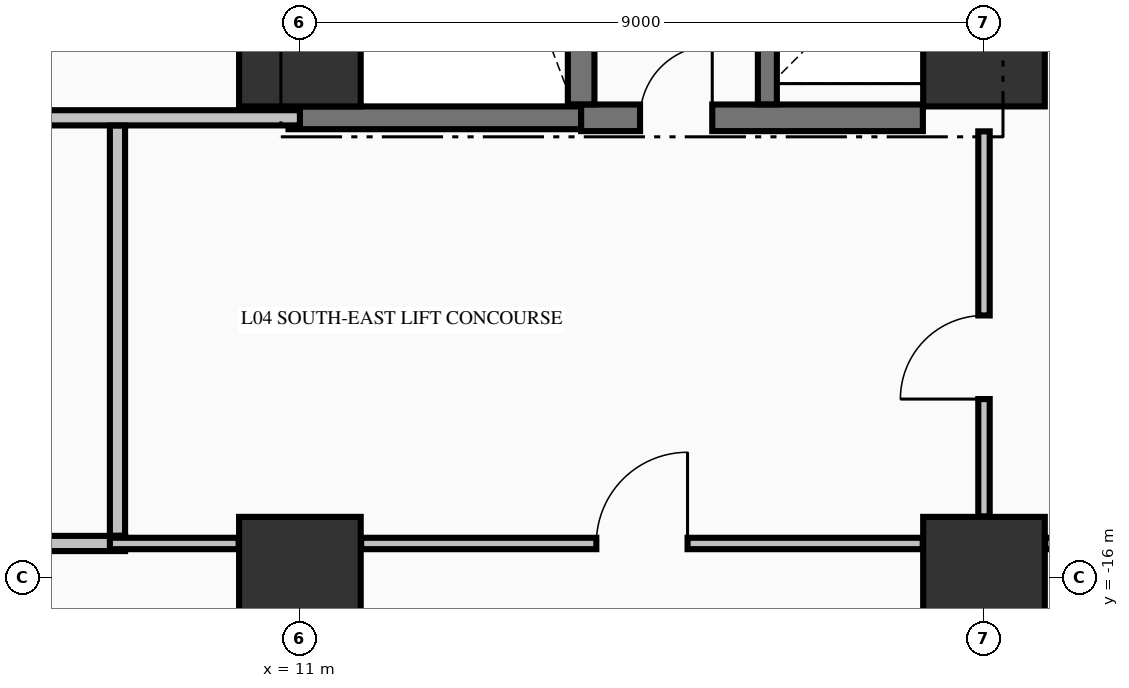
"""IFC4 building model, lengths in metres.
Left out: names, types, materials, properties, quantities, classifications, styles, units other than length and angle.
Written with IfcOpenShell. Run it as: python <this file> out.ifc"""

import sys

from ifc_helpers import new_model, si_unit, direction, frame, frame_2d, origin, origin_2d, place, context, subcontext, project, spatial, rectangle, extrude, element, fill, save


model = new_model("IFC4")
c1 = context("Model", 3, precision=1e-05, world=origin(), true_north=direction((0.0, 1.0)))
c2 = subcontext(c1, "Body", "Model", "MODEL_VIEW")
j1 = project(units=[si_unit("LENGTHUNIT", "METRE"), si_unit("PLANEANGLEUNIT", "RADIAN")], contexts=[c1])
p1 = place(None, origin())
s1 = spatial("IfcSite", under=j1, at=p1, CompositionType="ELEMENT")
p2 = place(p1, origin())
s2 = spatial("IfcBuilding", under=s1, at=p2, CompositionType="ELEMENT")
p3 = place(p2, frame((0.0, 0.0, 21.76)))
s3 = spatial("IfcBuildingStorey", under=s2, at=p3, CompositionType="ELEMENT", Elevation=21.76)
for number, where, z_axis, x_axis in (
    (1, (11.0, -16.0, -0.45), (0.0, 0.0, 1.0), (1.0, 0.0, 0.0)),
    (2, (11.0, -9.0, -0.45), (0.0, 0.0, 1.0), (1.0, 0.0, 0.0)),
    (3, (20.0, -16.0, -0.45), (0.0, 0.0, 1.0), (1.0, 0.0, 0.0)),
    (4, (20.0, -9.0, -0.45), (0.0, 0.0, 1.0), (1.0, 0.0, 0.0)),
):
    element("IfcColumn", number, at=place(p3, frame(where, z_axis=z_axis, x_axis=x_axis)), inside=s3, PredefinedType="COLUMN", context=c2, shape_type="SweptSolid", body=[
        extrude(rectangle(XDim=1.6, YDim=1.6, at=origin_2d()), origin(), (0.0, 0.0, 1.0), 5.44),
    ])
p4 = place(p3, frame((10.85, -9.95, 0.0), z_axis=(0.0, 0.0, 1.0), x_axis=(1.0, 0.0, 0.0)))
e5 = element("IfcWall", 5, at=p4, inside=s3, PredefinedType="SHEAR", context=c2, shape_type="SweptSolid", body=[
    extrude(rectangle(XDim=3.85, YDim=0.3, at=frame_2d((1.925, 0.0))), origin(), (0.0, 0.0, 1.0), 4.99),
])
p5 = place(p3, frame((14.7, -9.95, 0.0), z_axis=(0.0, 0.0, 1.0), x_axis=(1.0, 0.0, 0.0)))
e6 = element("IfcWall", 6, at=p5, inside=s3, PredefinedType="SHEAR", context=c2, shape_type="SweptSolid", body=[
    extrude(rectangle(XDim=4.496, YDim=0.35, at=frame_2d((2.248, 0.0))), origin(), (0.0, 0.0, 1.0), 4.99),
])
p6 = place(p5, frame((0.775, 0.0, 0.0)))
e7 = element("IfcOpeningElement", 7, at=p6, cuts=e6, PredefinedType="OPENING", context=c2, shape_type="SweptSolid", body=[
    extrude(rectangle(XDim=0.95, YDim=2.15, at=frame_2d((0.475, 1.075))), frame((0.0, 0.185, 0.0), z_axis=(0.0, -1.0, 0.0), x_axis=(1.0, 0.0, 0.0)), (0.0, 0.0, 1.0), 0.37),
])
p7 = place(p3, frame((0.706, -15.55, 0.0), z_axis=(0.0, 0.0, 1.0), x_axis=(1.0, 0.0, 0.0)))
e8 = element("IfcWall", 8, at=p7, inside=s3, PredefinedType="PARTITIONING", context=c2, shape_type="SweptSolid", body=[
    extrude(rectangle(XDim=7.994, YDim=0.2, at=frame_2d((3.997, 0.0))), origin(), (0.0, 0.0, 1.0), 3.332),
])
p8 = place(p7, frame((2.994, 0.0, 0.0)))
e9 = element("IfcOpeningElement", 9, at=p8, cuts=e8, PredefinedType="OPENING", context=c2, shape_type="SweptSolid", body=[
    extrude(rectangle(XDim=1.2, YDim=2.15, at=frame_2d((0.6, 1.075))), frame((0.0, 0.11, 0.0), z_axis=(0.0, -1.0, 0.0), x_axis=(1.0, 0.0, 0.0)), (0.0, 0.0, 1.0), 0.22),
])
p9 = place(p3, frame((8.5, -15.55, 0.0), z_axis=(0.0, 0.0, 1.0), x_axis=(1.0, 0.0, 0.0)))
e10 = element("IfcWall", 10, at=p9, inside=s3, PredefinedType="PARTITIONING", context=c2, shape_type="SweptSolid", body=[
    extrude(rectangle(XDim=1.694, YDim=0.15, at=frame_2d((0.847, 0.0))), origin(), (0.0, 0.0, 1.0), 3.332),
])
p10 = place(p3, frame((11.806, -15.55, 0.0), z_axis=(0.0, 0.0, 1.0), x_axis=(1.0, 0.0, 0.0)))
e11 = element("IfcWall", 11, at=p10, inside=s3, PredefinedType="PARTITIONING", context=c2, shape_type="SweptSolid", body=[
    extrude(rectangle(XDim=7.388, YDim=0.15, at=frame_2d((3.694, 0.0))), origin(), (0.0, 0.0, 1.0), 3.332),
])
p11 = place(p10, frame((3.094, 0.0, 0.0)))
e12 = element("IfcOpeningElement", 12, at=p11, cuts=e11, PredefinedType="OPENING", context=c2, shape_type="SweptSolid", body=[
    extrude(rectangle(XDim=1.2, YDim=2.15, at=frame_2d((0.6, 1.075))), frame((0.0, 0.085, 0.0), z_axis=(0.0, -1.0, 0.0), x_axis=(1.0, 0.0, 0.0)), (0.0, 0.0, 1.0), 0.17),
])
p12 = place(p3, frame((20.806, -15.55, 0.0), z_axis=(0.0, 0.0, 1.0), x_axis=(1.0, 0.0, 0.0)))
e13 = element("IfcWall", 13, at=p12, inside=s3, PredefinedType="PARTITIONING", context=c2, shape_type="SweptSolid", body=[
    extrude(rectangle(XDim=4.488, YDim=0.15, at=frame_2d((2.244, 0.0))), origin(), (0.0, 0.0, 1.0), 3.332),
])
p13 = place(p12, frame((0.15, 0.0, 0.0)))
e14 = element("IfcOpeningElement", 14, at=p13, cuts=e13, PredefinedType="OPENING", context=c2, shape_type="SweptSolid", body=[
    extrude(rectangle(XDim=1.1, YDim=2.15, at=frame_2d((0.55, 1.075))), frame((0.0, 0.085, 0.0), z_axis=(0.0, -1.0, 0.0), x_axis=(1.0, 0.0, 0.0)), (0.0, 0.0, 1.0), 0.17),
])
p14 = place(p12, frame((2.844, 0.0, 0.0)))
e15 = element("IfcOpeningElement", 15, at=p14, cuts=e13, PredefinedType="OPENING", context=c2, shape_type="SweptSolid", body=[
    extrude(rectangle(XDim=1.1, YDim=2.15, at=frame_2d((0.55, 1.075))), frame((0.0, 0.085, 0.0), z_axis=(0.0, -1.0, 0.0), x_axis=(1.0, 0.0, 0.0)), (0.0, 0.0, 1.0), 0.17),
])
p15 = place(p3, frame((-4.4, -9.95, 0.0), z_axis=(0.0, 0.0, 1.0), x_axis=(1.0, 0.0, 0.0)))
e16 = element("IfcWall", 16, at=p15, inside=s3, PredefinedType="PARTITIONING", context=c2, shape_type="SweptSolid", body=[
    extrude(rectangle(XDim=15.4, YDim=0.2, at=frame_2d((7.7, 0.0))), origin(), (0.0, 0.0, 1.0), 3.332),
])
p16 = place(p3, frame((14.7, -9.773, 0.0), z_axis=(0.0, 0.0, 1.0), x_axis=(0.0, 1.0, 0.0)))
e17 = element("IfcWall", 17, at=p16, inside=s3, PredefinedType="SHEAR", context=c2, shape_type="SweptSolid", body=[
    extrude(rectangle(XDim=9.371, YDim=0.35, at=frame_2d((4.686, 0.0))), origin(), (0.0, 0.0, 1.0), 4.99),
])
p17 = place(p3, frame((17.15, -9.773, 0.0), z_axis=(0.0, 0.0, 1.0), x_axis=(0.0, 1.0, 0.0)))
e18 = element("IfcWall", 18, at=p17, inside=s3, PredefinedType="SOLIDWALL", context=c2, shape_type="SweptSolid", body=[
    extrude(rectangle(XDim=2.596, YDim=0.25, at=frame_2d((1.298, 0.0))), origin(), (0.0, 0.0, 1.0), 4.99),
])
p18 = place(p3, frame((8.6, -15.447, 0.0), z_axis=(0.0, 0.0, 1.0), x_axis=(0.0, 1.0, 0.0)))
e19 = element("IfcWall", 19, at=p18, inside=s3, PredefinedType="PARTITIONING", context=c2, shape_type="SweptSolid", body=[
    extrude(rectangle(XDim=5.394, YDim=0.2, at=frame_2d((2.697, 0.0))), origin(), (0.0, 0.0, 1.0), 4.99),
])
p19 = place(p3, frame((20.0, -15.194, 0.0), z_axis=(0.0, 0.0, 1.0), x_axis=(0.0, 1.0, 0.0)))
e20 = element("IfcWall", 20, at=p19, inside=s3, PredefinedType="PARTITIONING", context=c2, shape_type="SweptSolid", body=[
    extrude(rectangle(XDim=5.066, YDim=0.15, at=frame_2d((2.533, 0.0))), origin(), (0.0, 0.0, 1.0), 4.032),
])
p20 = place(p19, frame((1.544, 0.0, 0.0)))
e21 = element("IfcOpeningElement", 21, at=p20, cuts=e20, PredefinedType="OPENING", context=c2, shape_type="SweptSolid", body=[
    extrude(rectangle(XDim=1.1, YDim=2.15, at=frame_2d((0.55, 1.075))), frame((0.0, 0.085, 0.0), z_axis=(0.0, -1.0, 0.0), x_axis=(1.0, 0.0, 0.0)), (0.0, 0.0, 1.0), 0.17),
])
p21 = place(p6, origin())
e22 = element("IfcDoor", 22, at=p21, inside=s3, OperationType="SINGLE_SWING_RIGHT", PredefinedType="DOOR", context=c2, shape_type="SweptSolid", body=[
    extrude(rectangle(XDim=0.95, YDim=2.15, at=frame_2d((0.475, 1.075))), frame((0.0, 0.025, 0.0), z_axis=(0.0, -1.0, 0.0), x_axis=(1.0, 0.0, 0.0)), (0.0, 0.0, 1.0), 0.05),
])
fill(e7, e22)
p22 = place(p20, origin())
e23 = element("IfcDoor", 23, at=p22, inside=s3, OperationType="SINGLE_SWING_LEFT", PredefinedType="DOOR", context=c2, shape_type="SweptSolid", body=[
    extrude(rectangle(XDim=1.1, YDim=2.15, at=frame_2d((0.55, 1.075))), frame((0.0, 0.025, 0.0), z_axis=(0.0, -1.0, 0.0), x_axis=(1.0, 0.0, 0.0)), (0.0, 0.0, 1.0), 0.05),
])
fill(e21, e23)
p23 = place(p11, origin())
e24 = element("IfcDoor", 24, at=p23, inside=s3, OperationType="SINGLE_SWING_RIGHT", PredefinedType="DOOR", context=c2, shape_type="SweptSolid", body=[
    extrude(rectangle(XDim=1.2, YDim=2.15, at=frame_2d((0.6, 1.075))), frame((0.0, 0.025, 0.0), z_axis=(0.0, -1.0, 0.0), x_axis=(1.0, 0.0, 0.0)), (0.0, 0.0, 1.0), 0.05),
])
fill(e12, e24)
save(model, sys.argv[1])
